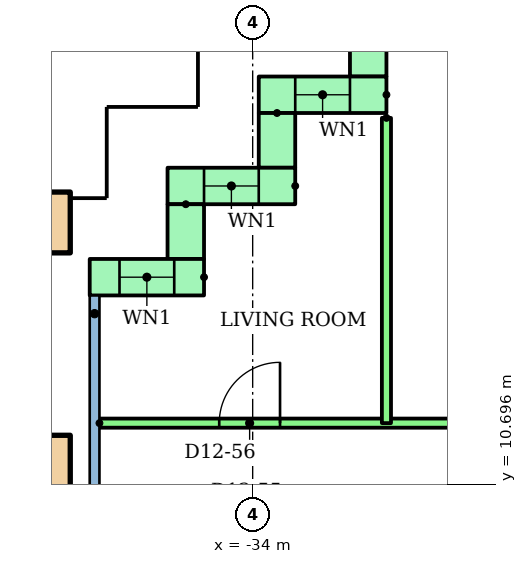
"""IFC4 building model, lengths in metres.
Left out: names, types, materials, properties, quantities, classifications, styles, units other than length and angle.
Written with IfcOpenShell. Run it as: python <this file> out.ifc"""

import sys

from ifc_helpers import new_model, si_unit, direction, frame, frame_2d, origin, origin_2d, place, context, subcontext, project, spatial, rectangle, hollow_rectangle, extrude, element, fill, save


model = new_model("IFC4")
c1 = context("Model", 3, precision=1e-05, world=origin(), true_north=direction((0.0, 1.0)))
c2 = subcontext(c1, "Body", "Model", "MODEL_VIEW")
j1 = project(units=[si_unit("LENGTHUNIT", "METRE"), si_unit("PLANEANGLEUNIT", "RADIAN")], contexts=[c1])
p1 = place(None, origin())
s1 = spatial("IfcSite", under=j1, at=p1, CompositionType="ELEMENT")
p2 = place(p1, origin())
s2 = spatial("IfcBuilding", under=s1, at=p2, CompositionType="ELEMENT")
p3 = place(p2, frame((0.0, 0.0, 48.0)))
s3 = spatial("IfcBuildingStorey", under=s2, at=p3, CompositionType="ELEMENT", Elevation=48.0)
for number, where in (
    (1, (-37.5, 11.0, 0.0)),
    (2, (-37.5, 15.0, 0.0)),
):
    element("IfcColumn", number, at=place(p3, frame(where)), inside=s3, PredefinedType="COLUMN", context=c2, shape_type="SweptSolid", body=[
        extrude(hollow_rectangle(XDim=1.0, YDim=1.0, WallThickness=0.05, at=origin_2d()), origin(), (0.0, 0.0, 1.0), 3.2),
    ])
p4 = place(p3, frame((-32.1, 18.68, 0.0), z_axis=(0.0, 0.0, 1.0), x_axis=(0.0, -1.0, 0.0)))
e3 = element("IfcWall", 3, at=p4, inside=s3, PredefinedType="STANDARD", context=c2, shape_type="SweptSolid", body=[
    extrude(rectangle(XDim=1.28, YDim=0.6, at=frame_2d((0.64, 0.0))), origin(), (0.0, 0.0, 1.0), 2.92),
])
p5 = place(p3, frame((-31.8, 17.1, 0.0), z_axis=(0.0, 0.0, 1.0), x_axis=(-1.0, 0.0, 0.0)))
e4 = element("IfcWall", 4, at=p5, inside=s3, PredefinedType="STANDARD", context=c2, shape_type="SweptSolid", body=[
    extrude(rectangle(XDim=2.1, YDim=0.6, at=frame_2d((1.05, 0.0))), origin(), (0.0, 0.0, 1.0), 2.92),
])
p6 = place(p5, frame((0.6, 0.0, 0.9)))
e5 = element("IfcOpeningElement", 5, at=p6, cuts=e4, PredefinedType="OPENING", context=c2, shape_type="SweptSolid", body=[
    extrude(rectangle(XDim=0.9, YDim=1.5, at=frame_2d((0.45, 0.75))), frame((0.0, 0.31, 0.0), z_axis=(0.0, -1.0, 0.0), x_axis=(1.0, 0.0, 0.0)), (0.0, 0.0, 1.0), 0.62),
])
p7 = place(p3, frame((-33.6, 16.8, 0.0), z_axis=(0.0, 0.0, 1.0), x_axis=(0.0, -1.0, 0.0)))
e6 = element("IfcWall", 6, at=p7, inside=s3, PredefinedType="STANDARD", context=c2, shape_type="SweptSolid", body=[
    extrude(rectangle(XDim=0.9, YDim=0.6, at=frame_2d((0.45, 0.0))), origin(), (0.0, 0.0, 1.0), 2.92),
])
p8 = place(p3, frame((-33.3, 15.6, 0.0), z_axis=(0.0, 0.0, 1.0), x_axis=(-1.0, 0.0, 0.0)))
e7 = element("IfcWall", 7, at=p8, inside=s3, PredefinedType="STANDARD", context=c2, shape_type="SweptSolid", body=[
    extrude(rectangle(XDim=2.1, YDim=0.6, at=frame_2d((1.05, 0.0))), origin(), (0.0, 0.0, 1.0), 2.92),
])
p9 = place(p8, frame((0.6, 0.0, 0.9)))
e8 = element("IfcOpeningElement", 8, at=p9, cuts=e7, PredefinedType="OPENING", context=c2, shape_type="SweptSolid", body=[
    extrude(rectangle(XDim=0.9, YDim=1.5, at=frame_2d((0.45, 0.75))), frame((0.0, 0.31, 0.0), z_axis=(0.0, -1.0, 0.0), x_axis=(1.0, 0.0, 0.0)), (0.0, 0.0, 1.0), 0.62),
])
p10 = place(p3, frame((-35.1, 15.3, 0.0), z_axis=(0.0, 0.0, 1.0), x_axis=(0.0, -1.0, 0.0)))
e9 = element("IfcWall", 9, at=p10, inside=s3, PredefinedType="STANDARD", context=c2, shape_type="SweptSolid", body=[
    extrude(rectangle(XDim=0.9, YDim=0.6, at=frame_2d((0.45, 0.0))), origin(), (0.0, 0.0, 1.0), 2.92),
])
p11 = place(p3, frame((-34.8, 14.1, 0.0), z_axis=(0.0, 0.0, 1.0), x_axis=(-1.0, 0.0, 0.0)))
e10 = element("IfcWall", 10, at=p11, inside=s3, PredefinedType="STANDARD", context=c2, shape_type="SweptSolid", body=[
    extrude(rectangle(XDim=1.88, YDim=0.6, at=frame_2d((0.94, 0.0))), origin(), (0.0, 0.0, 1.0), 2.92),
])
p12 = place(p11, frame((0.49, 0.0, 0.9)))
e11 = element("IfcOpeningElement", 11, at=p12, cuts=e10, PredefinedType="OPENING", context=c2, shape_type="SweptSolid", body=[
    extrude(rectangle(XDim=0.9, YDim=1.5, at=frame_2d((0.45, 0.75))), frame((0.0, 0.31, 0.0), z_axis=(0.0, -1.0, 0.0), x_axis=(1.0, 0.0, 0.0)), (0.0, 0.0, 1.0), 0.62),
])
p13 = place(p3, frame((-36.52, 11.7, 0.0)))
e12 = element("IfcWall", 12, at=p13, inside=s3, PredefinedType="PARTITIONING", context=c2, shape_type="SweptSolid", body=[
    extrude(rectangle(XDim=22.52, YDim=0.15, at=frame_2d((11.26, 0.0))), origin(), (0.0, 0.0, 1.0), 2.4),
])
p14 = place(p13, frame((1.97, 0.0, 0.0)))
e13 = element("IfcOpeningElement", 13, at=p14, cuts=e12, PredefinedType="OPENING", context=c2, shape_type="SweptSolid", body=[
    extrude(rectangle(XDim=1.0, YDim=2.1, at=frame_2d((0.5, 1.05))), frame((0.0, 0.085, 0.0), z_axis=(0.0, -1.0, 0.0), x_axis=(1.0, 0.0, 0.0)), (0.0, 0.0, 1.0), 0.17),
])
p15 = place(p13, frame((9.17, 0.0, 0.0)))
e14 = element("IfcOpeningElement", 14, at=p15, cuts=e12, PredefinedType="OPENING", context=c2, shape_type="SweptSolid", body=[
    extrude(rectangle(XDim=0.9, YDim=2.1, at=frame_2d((0.45, 1.05))), frame((0.0, 0.085, 0.0), z_axis=(0.0, -1.0, 0.0), x_axis=(1.0, 0.0, 0.0)), (0.0, 0.0, 1.0), 0.17),
])
p16 = place(p13, frame((18.07, 0.0, 0.0)))
e15 = element("IfcOpeningElement", 15, at=p16, cuts=e12, PredefinedType="OPENING", context=c2, shape_type="SweptSolid", body=[
    extrude(rectangle(XDim=0.9, YDim=2.1, at=frame_2d((0.45, 1.05))), frame((0.0, 0.085, 0.0), z_axis=(0.0, -1.0, 0.0), x_axis=(1.0, 0.0, 0.0)), (0.0, 0.0, 1.0), 0.17),
])
p17 = place(p3, frame((-31.8, 16.72, 0.0), z_axis=(0.0, 0.0, 1.0), x_axis=(0.0, -1.0, 0.0)))
e16 = element("IfcWall", 16, at=p17, inside=s3, PredefinedType="PARTITIONING", context=c2, shape_type="SweptSolid", body=[
    extrude(rectangle(XDim=5.02, YDim=0.15, at=frame_2d((2.51, 0.0))), origin(), (0.0, 0.0, 1.0), 2.4),
])
p18 = place(p6, origin())
e17 = element("IfcWindow", 17, at=p18, inside=s3, PartitioningType="SINGLE_PANEL", PredefinedType="WINDOW", context=c2, shape_type="SweptSolid", body=[
    extrude(rectangle(XDim=0.9, YDim=1.5, at=frame_2d((0.45, 0.75))), frame((0.0, 0.03, 0.0), z_axis=(0.0, -1.0, 0.0), x_axis=(1.0, 0.0, 0.0)), (0.0, 0.0, 1.0), 0.06),
])
fill(e5, e17)
p19 = place(p9, origin())
e18 = element("IfcWindow", 18, at=p19, inside=s3, PartitioningType="SINGLE_PANEL", PredefinedType="WINDOW", context=c2, shape_type="SweptSolid", body=[
    extrude(rectangle(XDim=0.9, YDim=1.5, at=frame_2d((0.45, 0.75))), frame((0.0, 0.03, 0.0), z_axis=(0.0, -1.0, 0.0), x_axis=(1.0, 0.0, 0.0)), (0.0, 0.0, 1.0), 0.06),
])
fill(e8, e18)
p20 = place(p12, origin())
e19 = element("IfcWindow", 19, at=p20, inside=s3, PartitioningType="SINGLE_PANEL", PredefinedType="WINDOW", context=c2, shape_type="SweptSolid", body=[
    extrude(rectangle(XDim=0.9, YDim=1.5, at=frame_2d((0.45, 0.75))), frame((0.0, 0.03, 0.0), z_axis=(0.0, -1.0, 0.0), x_axis=(1.0, 0.0, 0.0)), (0.0, 0.0, 1.0), 0.06),
])
fill(e11, e19)
p21 = place(p14, origin())
e20 = element("IfcDoor", 20, at=p21, inside=s3, OperationType="SINGLE_SWING_RIGHT", PredefinedType="DOOR", context=c2, shape_type="SweptSolid", body=[
    extrude(rectangle(XDim=1.0, YDim=2.1, at=frame_2d((0.5, 1.05))), frame((0.0, 0.025, 0.0), z_axis=(0.0, -1.0, 0.0), x_axis=(1.0, 0.0, 0.0)), (0.0, 0.0, 1.0), 0.05),
])
fill(e13, e20)
save(model, sys.argv[1])
